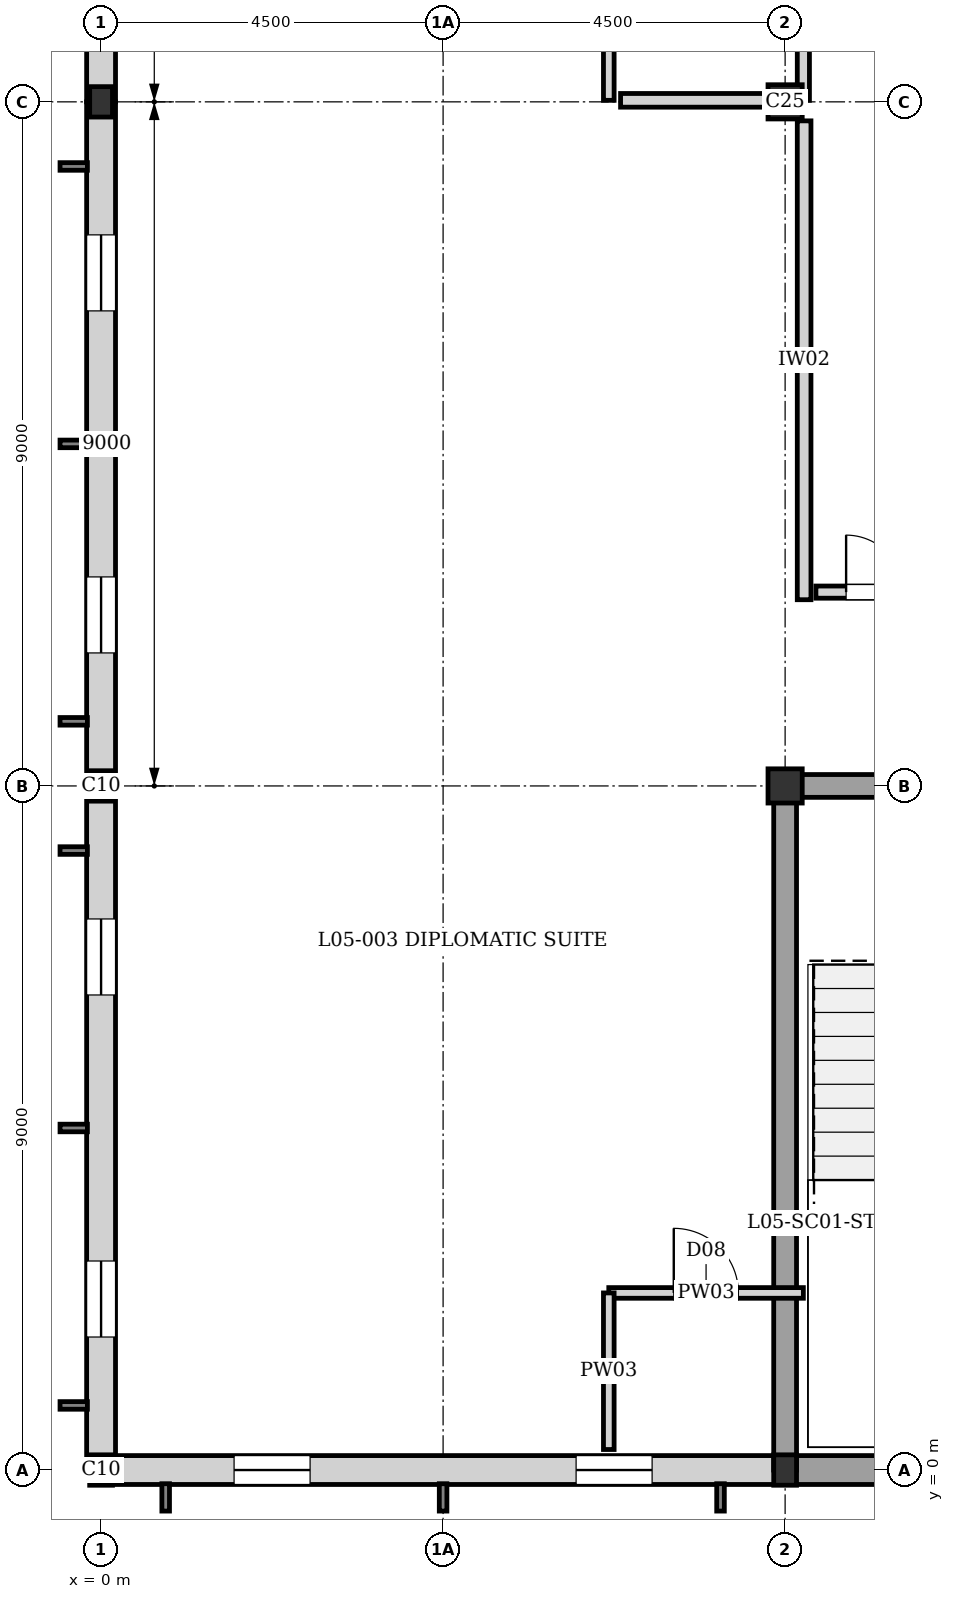
"""IFC4 building model, lengths in metres.
Left out: names, types, materials, properties, quantities, classifications, styles, units other than length and angle.
Written with IfcOpenShell. Run it as: python <this file> out.ifc"""

import sys

from ifc_helpers import new_model, si_unit, direction, frame, frame_2d, origin, origin_2d, place, context, subcontext, project, spatial, rectangle, i_section, extrude, element, fill, save


model = new_model("IFC4")
c1 = context("Model", 3, precision=1e-05, world=origin(), true_north=direction((0.0, 1.0)))
c2 = subcontext(c1, "Body", "Model", "MODEL_VIEW")
j1 = project(units=[si_unit("LENGTHUNIT", "METRE"), si_unit("PLANEANGLEUNIT", "RADIAN")], contexts=[c1])
p1 = place(None, origin())
s1 = spatial("IfcSite", under=j1, at=p1, CompositionType="ELEMENT")
p2 = place(p1, origin())
s2 = spatial("IfcBuilding", under=s1, at=p2, CompositionType="ELEMENT")
p3 = place(p2, frame((0.0, 0.0, 17.6)))
s3 = spatial("IfcBuildingStorey", under=s2, at=p3, CompositionType="ELEMENT", Elevation=17.6)
for number, where, z_axis, x_axis in (
    (1, (0.0, 0.0, 0.0), (0.0, 0.0, 1.0), (1.0, 0.0, 0.0)),
    (2, (0.0, 9.0, 0.0), (0.0, 0.0, 1.0), (1.0, 0.0, 0.0)),
    (3, (0.0, 18.0, 0.0), (0.0, 0.0, 1.0), (1.0, 0.0, 0.0)),
    (4, (9.0, 0.0, 0.0), (0.0, 0.0, 1.0), (1.0, 0.0, 0.0)),
):
    element("IfcColumn", number, at=place(p3, frame(where, z_axis=z_axis, x_axis=x_axis)), inside=s3, PredefinedType="COLUMN", context=c2, shape_type="SweptSolid", body=[
        extrude(i_section(OverallWidth=0.3, OverallDepth=0.4, WebThickness=0.013, FlangeThickness=0.024, at=origin_2d()), origin(), (0.0, 0.0, 1.0), 3.04),
    ])
for number, where, z_axis, x_axis in (
    (5, (9.0, 9.0, 0.0), (0.0, 0.0, 1.0), (1.0, 0.0, 0.0)),
    (6, (9.0, 18.0, 0.0), (0.0, 0.0, 1.0), (1.0, 0.0, 0.0)),
):
    element("IfcColumn", number, at=place(p3, frame(where, z_axis=z_axis, x_axis=x_axis)), inside=s3, PredefinedType="COLUMN", context=c2, shape_type="SweptSolid", body=[
        extrude(rectangle(XDim=0.45, YDim=0.45, at=origin_2d()), origin(), (0.0, 0.0, 1.0), 3.04),
    ])
p4 = place(p3, frame((18.0, 0.0, 0.0), z_axis=(0.0, 0.0, 1.0), x_axis=(-1.0, 0.0, 0.0)))
e7 = element("IfcWall", 7, at=p4, inside=s3, PredefinedType="SOLIDWALL", context=c2, shape_type="SweptSolid", body=[
    extrude(rectangle(XDim=9.0, YDim=0.38, at=frame_2d((4.5, 0.0))), origin(), (0.0, 0.0, 1.0), 2.82),
])
p5 = place(p3, frame((8.87, 0.0, 0.0), z_axis=(0.0, 0.0, 1.0), x_axis=(-1.0, 0.0, 0.0)))
e8 = element("IfcWall", 8, at=p5, inside=s3, PredefinedType="SOLIDWALL", context=c2, shape_type="SweptSolid", body=[
    extrude(rectangle(XDim=8.87, YDim=0.38, at=frame_2d((4.435, 0.0))), origin(), (0.0, 0.0, 1.0), 2.38),
])
p6 = place(p5, frame((1.62, 0.0, 0.35)))
e9 = element("IfcOpeningElement", 9, at=p6, cuts=e8, PredefinedType="OPENING", context=c2, shape_type="SweptSolid", body=[
    extrude(rectangle(XDim=1.0, YDim=1.6, at=frame_2d((0.5, 0.8))), frame((0.0, 0.2, 0.0), z_axis=(0.0, -1.0, 0.0), x_axis=(1.0, 0.0, 0.0)), (0.0, 0.0, 1.0), 0.4),
])
p7 = place(p5, frame((6.12, 0.0, 0.35)))
e10 = element("IfcOpeningElement", 10, at=p7, cuts=e8, PredefinedType="OPENING", context=c2, shape_type="SweptSolid", body=[
    extrude(rectangle(XDim=1.0, YDim=1.6, at=frame_2d((0.5, 0.8))), frame((0.0, 0.2, 0.0), z_axis=(0.0, -1.0, 0.0), x_axis=(1.0, 0.0, 0.0)), (0.0, 0.0, 1.0), 0.4),
])
p8 = place(p3, frame((0.0, 0.155, 0.0), z_axis=(0.0, 0.0, 1.0), x_axis=(0.0, 1.0, 0.0)))
e11 = element("IfcWall", 11, at=p8, inside=s3, PredefinedType="SOLIDWALL", context=c2, shape_type="SweptSolid", body=[
    extrude(rectangle(XDim=8.845, YDim=0.38, at=frame_2d((4.422, 0.0))), origin(), (0.0, 0.0, 1.0), 2.82),
])
p9 = place(p8, frame((1.595, 0.0, 0.35)))
e12 = element("IfcOpeningElement", 12, at=p9, cuts=e11, PredefinedType="OPENING", context=c2, shape_type="SweptSolid", body=[
    extrude(rectangle(XDim=1.0, YDim=1.6, at=frame_2d((0.5, 0.8))), frame((0.0, 0.2, 0.0), z_axis=(0.0, -1.0, 0.0), x_axis=(1.0, 0.0, 0.0)), (0.0, 0.0, 1.0), 0.4),
])
p10 = place(p8, frame((6.095, 0.0, 0.35)))
e13 = element("IfcOpeningElement", 13, at=p10, cuts=e11, PredefinedType="OPENING", context=c2, shape_type="SweptSolid", body=[
    extrude(rectangle(XDim=1.0, YDim=1.6, at=frame_2d((0.5, 0.8))), frame((0.0, 0.2, 0.0), z_axis=(0.0, -1.0, 0.0), x_axis=(1.0, 0.0, 0.0)), (0.0, 0.0, 1.0), 0.4),
])
p11 = place(p3, frame((0.0, 9.0, 0.0), z_axis=(0.0, 0.0, 1.0), x_axis=(0.0, 1.0, 0.0)))
e14 = element("IfcWall", 14, at=p11, inside=s3, PredefinedType="SOLIDWALL", context=c2, shape_type="SweptSolid", body=[
    extrude(rectangle(XDim=9.0, YDim=0.38, at=frame_2d((4.5, 0.0))), origin(), (0.0, 0.0, 1.0), 2.48),
])
p12 = place(p11, frame((1.75, 0.0, 0.35)))
e15 = element("IfcOpeningElement", 15, at=p12, cuts=e14, PredefinedType="OPENING", context=c2, shape_type="SweptSolid", body=[
    extrude(rectangle(XDim=1.0, YDim=1.6, at=frame_2d((0.5, 0.8))), frame((0.0, 0.2, 0.0), z_axis=(0.0, -1.0, 0.0), x_axis=(1.0, 0.0, 0.0)), (0.0, 0.0, 1.0), 0.4),
])
p13 = place(p11, frame((6.25, 0.0, 0.35)))
e16 = element("IfcOpeningElement", 16, at=p13, cuts=e14, PredefinedType="OPENING", context=c2, shape_type="SweptSolid", body=[
    extrude(rectangle(XDim=1.0, YDim=1.6, at=frame_2d((0.5, 0.8))), frame((0.0, 0.2, 0.0), z_axis=(0.0, -1.0, 0.0), x_axis=(1.0, 0.0, 0.0)), (0.0, 0.0, 1.0), 0.4),
])
p14 = place(p3, frame((0.0, 18.0, 0.0), z_axis=(0.0, 0.0, 1.0), x_axis=(0.0, 1.0, 0.0)))
e17 = element("IfcWall", 17, at=p14, inside=s3, PredefinedType="SOLIDWALL", context=c2, shape_type="SweptSolid", body=[
    extrude(rectangle(XDim=9.0, YDim=0.38, at=frame_2d((4.5, 0.0))), origin(), (0.0, 0.0, 1.0), 2.42),
])
p15 = place(p14, frame((1.75, 0.0, 0.35)))
e18 = element("IfcOpeningElement", 18, at=p15, cuts=e17, PredefinedType="OPENING", context=c2, shape_type="SweptSolid", body=[
    extrude(rectangle(XDim=1.0, YDim=1.6, at=frame_2d((0.5, 0.8))), frame((0.0, 0.2, 0.0), z_axis=(0.0, -1.0, 0.0), x_axis=(1.0, 0.0, 0.0)), (0.0, 0.0, 1.0), 0.4),
])
p16 = place(p14, frame((6.25, 0.0, 0.35)))
e19 = element("IfcOpeningElement", 19, at=p16, cuts=e17, PredefinedType="OPENING", context=c2, shape_type="SweptSolid", body=[
    extrude(rectangle(XDim=1.0, YDim=1.6, at=frame_2d((0.5, 0.8))), frame((0.0, 0.2, 0.0), z_axis=(0.0, -1.0, 0.0), x_axis=(1.0, 0.0, 0.0)), (0.0, 0.0, 1.0), 0.4),
])
p17 = place(p3, frame((9.0, 9.0, 0.0), z_axis=(0.0, 0.0, 1.0), x_axis=(1.0, 0.0, 0.0)))
e20 = element("IfcWall", 20, at=p17, inside=s3, PredefinedType="SHEAR", context=c2, shape_type="SweptSolid", body=[
    extrude(rectangle(XDim=9.0, YDim=0.3, at=frame_2d((4.5, 0.0))), origin(), (0.0, 0.0, 1.0), 2.82),
])
p18 = place(p17, frame((5.95, 0.0, 0.0)))
e21 = element("IfcOpeningElement", 21, at=p18, cuts=e20, PredefinedType="OPENING", context=c2, shape_type="SweptSolid", body=[
    extrude(rectangle(XDim=1.6, YDim=2.1, at=frame_2d((0.8, 1.05))), frame((0.0, 0.16, 0.0), z_axis=(0.0, -1.0, 0.0), x_axis=(1.0, 0.0, 0.0)), (0.0, 0.0, 1.0), 0.32),
])
p19 = place(p3, frame((9.0, 0.0, 0.0), z_axis=(0.0, 0.0, 1.0), x_axis=(0.0, 1.0, 0.0)))
e22 = element("IfcWall", 22, at=p19, inside=s3, PredefinedType="SHEAR", context=c2, shape_type="SweptSolid", body=[
    extrude(rectangle(XDim=9.0, YDim=0.3, at=frame_2d((4.5, 0.0))), origin(), (0.0, 0.0, 1.0), 2.82),
])
p20 = place(p3, frame((6.68, 2.33, 0.0), z_axis=(0.0, 0.0, 1.0), x_axis=(1.0, 0.0, 0.0)))
e23 = element("IfcWall", 23, at=p20, inside=s3, PredefinedType="PLUMBINGWALL", context=c2, shape_type="SweptSolid", body=[
    extrude(rectangle(XDim=2.56, YDim=0.14, at=frame_2d((1.28, 0.0))), origin(), (0.0, 0.0, 1.0), 2.82),
])
p21 = place(p20, frame((0.855, 0.0, 0.0)))
e24 = element("IfcOpeningElement", 24, at=p21, cuts=e23, PredefinedType="OPENING", context=c2, shape_type="SweptSolid", body=[
    extrude(rectangle(XDim=0.85, YDim=2.04, at=frame_2d((0.425, 1.02))), frame((0.0, 0.08, 0.0), z_axis=(0.0, -1.0, 0.0), x_axis=(1.0, 0.0, 0.0)), (0.0, 0.0, 1.0), 0.16),
])
p22 = place(p3, frame((6.68, 0.27, 0.0), z_axis=(0.0, 0.0, 1.0), x_axis=(0.0, 1.0, 0.0)))
e25 = element("IfcWall", 25, at=p22, inside=s3, PredefinedType="PLUMBINGWALL", context=c2, shape_type="SweptSolid", body=[
    extrude(rectangle(XDim=2.06, YDim=0.14, at=frame_2d((1.03, 0.0))), origin(), (0.0, 0.0, 1.0), 2.82),
])
p23 = place(p3, frame((9.24, 18.02, 0.0), z_axis=(0.0, 0.0, 1.0), x_axis=(0.0, 1.0, 0.0)))
e26 = element("IfcWall", 26, at=p23, inside=s3, PredefinedType="PARTITIONING", context=c2, shape_type="SweptSolid", body=[
    extrude(rectangle(XDim=2.06, YDim=0.16, at=frame_2d((1.03, 0.0))), origin(), (0.0, 0.0, 1.0), 2.82),
])
p24 = place(p3, frame((6.68, 18.02, 0.0), z_axis=(0.0, 0.0, 1.0), x_axis=(0.0, 1.0, 0.0)))
e27 = element("IfcWall", 27, at=p24, inside=s3, PredefinedType="PLUMBINGWALL", context=c2, shape_type="SweptSolid", body=[
    extrude(rectangle(XDim=2.06, YDim=0.14, at=frame_2d((1.03, 0.0))), origin(), (0.0, 0.0, 1.0), 2.82),
])
p25 = place(p3, frame((9.25, 11.45, 0.0), z_axis=(0.0, 0.0, 1.0), x_axis=(0.0, 1.0, 0.0)))
e28 = element("IfcWall", 28, at=p25, inside=s3, PredefinedType="PARTITIONING", context=c2, shape_type="SweptSolid", body=[
    extrude(rectangle(XDim=6.3, YDim=0.18, at=frame_2d((3.15, 0.0))), origin(), (0.0, 0.0, 1.0), 2.82),
])
p26 = place(p3, frame((6.835, 18.02, 0.0), z_axis=(0.0, 0.0, 1.0), x_axis=(1.0, 0.0, 0.0)))
e29 = element("IfcWall", 29, at=p26, inside=s3, PredefinedType="PARTITIONING", context=c2, shape_type="SweptSolid", body=[
    extrude(rectangle(XDim=2.26, YDim=0.18, at=frame_2d((1.13, 0.0))), origin(), (0.0, 0.0, 1.0), 2.38),
])
p27 = place(p3, frame((9.405, 11.55, 0.0), z_axis=(0.0, 0.0, 1.0), x_axis=(1.0, 0.0, 0.0)))
e30 = element("IfcWall", 30, at=p27, inside=s3, PredefinedType="PARTITIONING", context=c2, shape_type="SweptSolid", body=[
    extrude(rectangle(XDim=2.295, YDim=0.16, at=frame_2d((1.147, 0.0))), origin(), (0.0, 0.0, 1.0), 2.82),
])
p28 = place(p27, frame((0.397, 0.0, 0.0)))
e31 = element("IfcOpeningElement", 31, at=p28, cuts=e30, PredefinedType="OPENING", context=c2, shape_type="SweptSolid", body=[
    extrude(rectangle(XDim=1.5, YDim=2.1, at=frame_2d((0.75, 1.05))), frame((0.0, 0.09, 0.0), z_axis=(0.0, -1.0, 0.0), x_axis=(1.0, 0.0, 0.0)), (0.0, 0.0, 1.0), 0.18),
])
p29 = place(p6, origin())
e32 = element("IfcWindow", 32, at=p29, inside=s3, PartitioningType="SINGLE_PANEL", PredefinedType="WINDOW", context=c2, shape_type="SweptSolid", body=[
    extrude(rectangle(XDim=1.0, YDim=1.6, at=frame_2d((0.5, 0.8))), frame((0.0, 0.03, 0.0), z_axis=(0.0, -1.0, 0.0), x_axis=(1.0, 0.0, 0.0)), (0.0, 0.0, 1.0), 0.06),
])
fill(e9, e32)
p30 = place(p7, origin())
e33 = element("IfcWindow", 33, at=p30, inside=s3, PartitioningType="SINGLE_PANEL", PredefinedType="WINDOW", context=c2, shape_type="SweptSolid", body=[
    extrude(rectangle(XDim=1.0, YDim=1.6, at=frame_2d((0.5, 0.8))), frame((0.0, 0.03, 0.0), z_axis=(0.0, -1.0, 0.0), x_axis=(1.0, 0.0, 0.0)), (0.0, 0.0, 1.0), 0.06),
])
fill(e10, e33)
p31 = place(p9, origin())
e34 = element("IfcWindow", 34, at=p31, inside=s3, PartitioningType="SINGLE_PANEL", PredefinedType="WINDOW", context=c2, shape_type="SweptSolid", body=[
    extrude(rectangle(XDim=1.0, YDim=1.6, at=frame_2d((0.5, 0.8))), frame((0.0, 0.03, 0.0), z_axis=(0.0, -1.0, 0.0), x_axis=(1.0, 0.0, 0.0)), (0.0, 0.0, 1.0), 0.06),
])
fill(e12, e34)
p32 = place(p10, origin())
e35 = element("IfcWindow", 35, at=p32, inside=s3, PartitioningType="SINGLE_PANEL", PredefinedType="WINDOW", context=c2, shape_type="SweptSolid", body=[
    extrude(rectangle(XDim=1.0, YDim=1.6, at=frame_2d((0.5, 0.8))), frame((0.0, 0.03, 0.0), z_axis=(0.0, -1.0, 0.0), x_axis=(1.0, 0.0, 0.0)), (0.0, 0.0, 1.0), 0.06),
])
fill(e13, e35)
p33 = place(p12, origin())
e36 = element("IfcWindow", 36, at=p33, inside=s3, PartitioningType="SINGLE_PANEL", PredefinedType="WINDOW", context=c2, shape_type="SweptSolid", body=[
    extrude(rectangle(XDim=1.0, YDim=1.6, at=frame_2d((0.5, 0.8))), frame((0.0, 0.03, 0.0), z_axis=(0.0, -1.0, 0.0), x_axis=(1.0, 0.0, 0.0)), (0.0, 0.0, 1.0), 0.06),
])
fill(e15, e36)
p34 = place(p13, origin())
e37 = element("IfcWindow", 37, at=p34, inside=s3, PartitioningType="SINGLE_PANEL", PredefinedType="WINDOW", context=c2, shape_type="SweptSolid", body=[
    extrude(rectangle(XDim=1.0, YDim=1.6, at=frame_2d((0.5, 0.8))), frame((0.0, 0.03, 0.0), z_axis=(0.0, -1.0, 0.0), x_axis=(1.0, 0.0, 0.0)), (0.0, 0.0, 1.0), 0.06),
])
fill(e16, e37)
p35 = place(p21, origin())
e38 = element("IfcDoor", 38, at=p35, inside=s3, OperationType="SINGLE_SWING_LEFT", PredefinedType="DOOR", context=c2, shape_type="SweptSolid", body=[
    extrude(rectangle(XDim=0.85, YDim=2.04, at=frame_2d((0.425, 1.02))), frame((0.0, 0.025, 0.0), z_axis=(0.0, -1.0, 0.0), x_axis=(1.0, 0.0, 0.0)), (0.0, 0.0, 1.0), 0.05),
])
fill(e24, e38)
p36 = place(p28, origin())
e39 = element("IfcDoor", 39, at=p36, inside=s3, OperationType="DOUBLE_DOOR_SINGLE_SWING", PredefinedType="DOOR", context=c2, shape_type="SweptSolid", body=[
    extrude(rectangle(XDim=1.5, YDim=2.1, at=frame_2d((0.75, 1.05))), frame((0.0, 0.025, 0.0), z_axis=(0.0, -1.0, 0.0), x_axis=(1.0, 0.0, 0.0)), (0.0, 0.0, 1.0), 0.05),
])
fill(e31, e39)
save(model, sys.argv[1])
